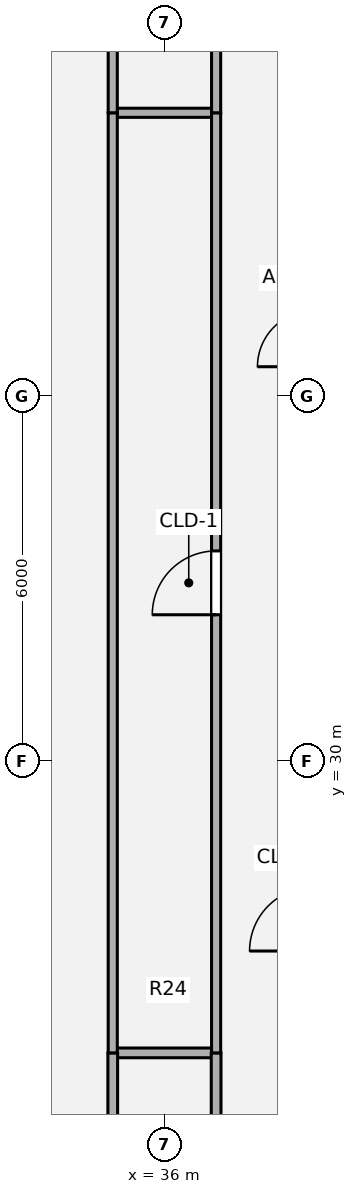
"""IFC4 building model, lengths in metres.
Left out: names, types, materials, properties, quantities, classifications, styles, units other than length and angle.
Written with IfcOpenShell. Run it as: python <this file> out.ifc"""

import sys

from ifc_helpers import new_model, si_unit, direction, frame, frame_2d, origin, origin_2d, place, context, subcontext, project, spatial, rectangle, extrude, source, transform, mapped, element, fill, save


model = new_model("IFC4")
c1 = context("Model", 3, precision=1e-05, world=origin(), true_north=direction((0.0, 1.0)))
c2 = subcontext(c1, "Body", "Model", "MODEL_VIEW")
j1 = project(units=[si_unit("LENGTHUNIT", "METRE"), si_unit("PLANEANGLEUNIT", "RADIAN")], contexts=[c1])
p1 = place(None, origin())
s1 = spatial("IfcSite", under=j1, at=p1, CompositionType="ELEMENT")
p2 = place(p1, origin())
s2 = spatial("IfcBuilding", under=s1, at=p2, CompositionType="ELEMENT")
p3 = place(p2, frame((0.0, 0.0, 163.98)))
s3 = spatial("IfcBuildingStorey", under=s2, at=p3, CompositionType="ELEMENT", Elevation=163.98)
p4 = place(p3, frame((35.15, 25.2, 0.0), z_axis=(0.0, 0.0, 1.0), x_axis=(1.0, 0.0, 0.0)))
e1 = element("IfcWall", 1, at=p4, inside=s3, PredefinedType="PLUMBINGWALL", context=c2, shape_type="SweptSolid", body=[
    extrude(rectangle(XDim=1.7, YDim=0.16, at=frame_2d((0.85, 0.0))), origin(), (0.0, 0.0, 1.0), 3.5),
])
p5 = place(p3, frame((35.15, 40.66, 0.0), z_axis=(0.0, 0.0, 1.0), x_axis=(1.0, 0.0, 0.0)))
e2 = element("IfcWall", 2, at=p5, inside=s3, PredefinedType="PARTITIONING", context=c2, shape_type="SweptSolid", body=[
    extrude(rectangle(XDim=1.7, YDim=0.15, at=frame_2d((0.85, 0.0))), origin(), (0.0, 0.0, 1.0), 3.259),
])
p6 = place(p3, frame((35.15, 20.2, 0.0), z_axis=(0.0, 0.0, 1.0), x_axis=(0.0, 1.0, 0.0)))
e3 = element("IfcWall", 3, at=p6, inside=s3, PredefinedType="PLUMBINGWALL", context=c2, shape_type="SweptSolid", body=[
    extrude(rectangle(XDim=5.0, YDim=0.16, at=frame_2d((2.5, 0.0))), origin(), (0.0, 0.0, 1.0), 3.5),
])
p7 = place(p6, frame((2.07, 0.0, 0.0)))
e4 = element("IfcOpeningElement", 4, at=p7, cuts=e3, PredefinedType="OPENING", context=c2, shape_type="SweptSolid", body=[
    extrude(rectangle(XDim=0.86, YDim=2.1, at=origin_2d()), frame((0.43, 0.09, 1.05), z_axis=(0.0, -1.0, 0.0), x_axis=(1.0, 0.0, 0.0)), (0.0, 0.0, 1.0), 0.18),
])
p8 = place(p3, frame((35.15, 25.2, 0.0), z_axis=(0.0, 0.0, 1.0), x_axis=(0.0, 1.0, 0.0)))
e5 = element("IfcWall", 5, at=p8, inside=s3, PredefinedType="PARTITIONING", context=c2, shape_type="SweptSolid", body=[
    extrude(rectangle(XDim=15.46, YDim=0.15, at=frame_2d((7.73, 0.0))), origin(), (0.0, 0.0, 1.0), 3.5),
])
p9 = place(p3, frame((35.15, 40.66, 0.0), z_axis=(0.0, 0.0, 1.0), x_axis=(0.0, 1.0, 0.0)))
e6 = element("IfcWall", 6, at=p9, inside=s3, PredefinedType="PARTITIONING", context=c2, shape_type="SweptSolid", body=[
    extrude(rectangle(XDim=10.54, YDim=0.15, at=frame_2d((5.27, 0.0))), origin(), (0.0, 0.0, 1.0), 3.5),
])
p10 = place(p9, frame((4.81, 0.0, 0.0)))
e7 = element("IfcOpeningElement", 7, at=p10, cuts=e6, PredefinedType="OPENING", context=c2, shape_type="SweptSolid", body=[
    extrude(rectangle(XDim=0.86, YDim=2.1, at=origin_2d()), frame((0.43, 0.085, 1.05), z_axis=(0.0, -1.0, 0.0), x_axis=(1.0, 0.0, 0.0)), (0.0, 0.0, 1.0), 0.17),
])
p11 = place(p3, frame((36.85, 20.2, 0.0), z_axis=(0.0, 0.0, 1.0), x_axis=(0.0, 1.0, 0.0)))
e8 = element("IfcWall", 8, at=p11, inside=s3, PredefinedType="PLUMBINGWALL", context=c2, shape_type="SweptSolid", body=[
    extrude(rectangle(XDim=5.0, YDim=0.16, at=frame_2d((2.5, 0.0))), origin(), (0.0, 0.0, 1.0), 3.5),
])
p12 = place(p3, frame((36.85, 25.2, 0.0), z_axis=(0.0, 0.0, 1.0), x_axis=(0.0, 1.0, 0.0)))
e9 = element("IfcWall", 9, at=p12, inside=s3, PredefinedType="PARTITIONING", context=c2, shape_type="SweptSolid", body=[
    extrude(rectangle(XDim=15.46, YDim=0.15, at=frame_2d((7.73, 0.0))), origin(), (0.0, 0.0, 1.0), 3.5),
])
p13 = place(p12, frame((7.205, 0.0, 0.0)))
e10 = element("IfcOpeningElement", 10, at=p13, cuts=e9, PredefinedType="OPENING", context=c2, shape_type="SweptSolid", body=[
    extrude(rectangle(XDim=1.05, YDim=2.1, at=origin_2d()), frame((0.525, 0.085, 1.05), z_axis=(0.0, -1.0, 0.0), x_axis=(1.0, 0.0, 0.0)), (0.0, 0.0, 1.0), 0.17),
])
p14 = place(p3, frame((36.85, 40.66, 0.0), z_axis=(0.0, 0.0, 1.0), x_axis=(0.0, 1.0, 0.0)))
e11 = element("IfcWall", 11, at=p14, inside=s3, PredefinedType="PARTITIONING", context=c2, shape_type="SweptSolid", body=[
    extrude(rectangle(XDim=10.54, YDim=0.15, at=frame_2d((5.27, 0.0))), origin(), (0.0, 0.0, 1.0), 3.5),
])
m1 = source(origin(), c2, "Body", "SweptSolid", [
    extrude(rectangle(XDim=1.05, YDim=2.1, at=origin_2d()), frame((0.525, 0.025, 1.05), z_axis=(0.0, -1.0, 0.0), x_axis=(1.0, 0.0, 0.0)), (0.0, 0.0, 1.0), 0.05),
])
p15 = place(p13, origin())
e12 = element("IfcDoor", 12, at=p15, inside=s3, OperationType="SINGLE_SWING_LEFT", PredefinedType="DOOR", context=c2, shape_type="MappedRepresentation", body=[
    mapped(m1, transform((0.0, 0.0, 0.0), x_axis=(1.0, 0.0, 0.0), y_axis=(0.0, 1.0, 0.0), z_axis=(0.0, 0.0, 1.0), scale=1.0)),
])
fill(e10, e12)
save(model, sys.argv[1])
